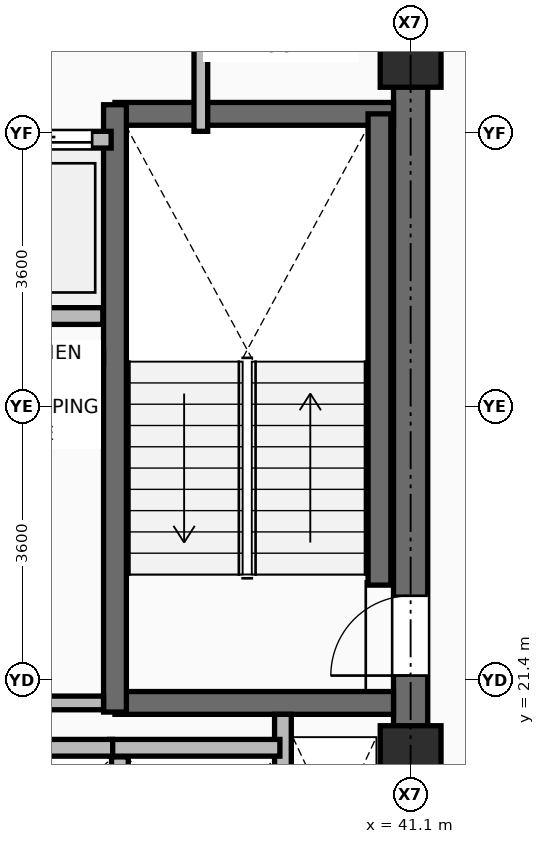
"""IFC4 building model, lengths in metres.
Left out: names, types, materials, properties, quantities, classifications, styles, units other than length and angle.
Written with IfcOpenShell. Run it as: python <this file> out.ifc"""

import sys

from ifc_helpers import new_model, si_unit, direction, frame, frame_2d, origin, origin_2d, place, context, subcontext, project, spatial, rectangle, extrude, element, fill, save


model = new_model("IFC4")
c1 = context("Model", 3, precision=1e-05, world=origin(), true_north=direction((0.0, 1.0)))
c2 = subcontext(c1, "Body", "Model", "MODEL_VIEW")
j1 = project(units=[si_unit("LENGTHUNIT", "METRE"), si_unit("PLANEANGLEUNIT", "RADIAN")], contexts=[c1])
p1 = place(None, origin())
s1 = spatial("IfcSite", under=j1, at=p1, CompositionType="ELEMENT")
p2 = place(p1, origin())
s2 = spatial("IfcBuilding", under=s1, at=p2, CompositionType="ELEMENT")
p3 = place(p2, frame((0.0, 0.0, 249.9)))
s3 = spatial("IfcBuildingStorey", under=s2, at=p3, CompositionType="ELEMENT", Elevation=249.9)
for number, where, z_axis, x_axis in (
    (1, (41.1, 20.4, 0.0), (0.0, 0.0, 1.0), (1.0, 0.0, 0.0)),
    (2, (41.1, 29.6, 0.0), (0.0, 0.0, 1.0), (1.0, 0.0, 0.0)),
):
    element("IfcColumn", number, at=place(p3, frame(where, z_axis=z_axis, x_axis=x_axis)), inside=s3, PredefinedType="COLUMN", context=c2, shape_type="SweptSolid", body=[
        extrude(rectangle(XDim=0.8, YDim=0.8, at=origin_2d()), origin(), (0.0, 0.0, 1.0), 3.75),
    ])
p4 = place(p3, frame((37.275, 18.08, 0.0), z_axis=(0.0, 0.0, 1.0), x_axis=(0.0, 1.0, 0.0)))
e3 = element("IfcWall", 3, at=p4, inside=s3, PredefinedType="PARTITIONING", context=c2, shape_type="SweptSolid", body=[
    extrude(rectangle(XDim=2.31, YDim=0.22, at=frame_2d((1.155, 0.0))), origin(), (0.0, 0.0, 1.0), 3.475),
])
p5 = place(p3, frame((34.91, 26.19, 0.0), z_axis=(0.0, 0.0, 1.0), x_axis=(1.0, 0.0, 0.0)))
e4 = element("IfcWall", 4, at=p5, inside=s3, PredefinedType="PARTITIONING", context=c2, shape_type="SweptSolid", body=[
    extrude(rectangle(XDim=2.14, YDim=0.22, at=frame_2d((1.07, 0.0))), origin(), (0.0, 0.0, 1.0), 3.475),
])
p6 = place(p3, frame((41.1, 18.025, 0.0), z_axis=(0.0, 0.0, 1.0), x_axis=(0.0, 1.0, 0.0)))
e5 = element("IfcWall", 5, at=p6, inside=s3, PredefinedType="SHEAR", context=c2, shape_type="SweptSolid", body=[
    extrude(rectangle(XDim=14.2, YDim=0.45, at=frame_2d((7.1, 0.0))), origin(), (0.0, 0.0, 1.0), 3.5),
])
p7 = place(p6, frame((3.435, 0.0, 0.0)))
e6 = element("IfcOpeningElement", 6, at=p7, cuts=e5, PredefinedType="OPENING", context=c2, shape_type="SweptSolid", body=[
    extrude(rectangle(XDim=1.05, YDim=2.1, at=frame_2d((0.525, 1.05))), frame((0.0, 0.235, 0.0), z_axis=(0.0, -1.0, 0.0), x_axis=(1.0, 0.0, 0.0)), (0.0, 0.0, 1.0), 0.47),
])
for number, where, z_axis, x_axis in (
    (7, (37.21, 21.1, 0.0), (0.0, 0.0, 1.0), (1.0, 0.0, 0.0)),
    (8, (37.21, 28.85, 0.0), (0.0, 0.0, 1.0), (1.0, 0.0, 0.0)),
):
    element("IfcWall", number, at=place(p3, frame(where, z_axis=z_axis, x_axis=x_axis)), inside=s3, PredefinedType="SHEAR", context=c2, shape_type="SweptSolid", body=[
        extrude(rectangle(XDim=3.665, YDim=0.3, at=frame_2d((1.833, 0.0))), origin(), (0.0, 0.0, 1.0), 3.5),
    ])
p8 = place(p3, frame((37.21, 20.98, 0.0), z_axis=(0.0, 0.0, 1.0), x_axis=(0.0, 1.0, 0.0)))
e9 = element("IfcWall", 9, at=p8, inside=s3, PredefinedType="SHEAR", context=c2, shape_type="SweptSolid", body=[
    extrude(rectangle(XDim=7.99, YDim=0.3, at=frame_2d((3.995, 0.0))), origin(), (0.0, 0.0, 1.0), 3.5),
])
p9 = place(p3, frame((40.69, 22.65, 0.0), z_axis=(0.0, 0.0, 1.0), x_axis=(0.0, 1.0, 0.0)))
e10 = element("IfcWall", 10, at=p9, inside=s3, PredefinedType="SHEAR", context=c2, shape_type="SweptSolid", body=[
    extrude(rectangle(XDim=6.2, YDim=0.3, at=frame_2d((3.1, 0.0))), origin(), (0.0, 0.0, 1.0), 3.5),
])
p10 = place(p3, frame((39.42, 18.025, 0.0), z_axis=(0.0, 0.0, 1.0), x_axis=(0.0, 1.0, 0.0)))
e11 = element("IfcWall", 11, at=p10, inside=s3, PredefinedType="PARTITIONING", context=c2, shape_type="SweptSolid", body=[
    extrude(rectangle(XDim=2.925, YDim=0.22, at=frame_2d((1.462, 0.0))), origin(), (0.0, 0.0, 1.0), 3.48),
])
for number, where, z_axis, x_axis in (
    (12, (37.14, 20.51, 0.0), (0.0, 0.0, 1.0), (1.0, 0.0, 0.0)),
    (13, (34.94, 20.51, 0.0), (0.0, 0.0, 1.0), (1.0, 0.0, 0.0)),
):
    element("IfcWall", number, at=place(p3, frame(where, z_axis=z_axis, x_axis=x_axis)), inside=s3, PredefinedType="PARTITIONING", context=c2, shape_type="SweptSolid", body=[
        extrude(rectangle(XDim=2.24, YDim=0.22, at=frame_2d((1.12, 0.0))), origin(), (0.0, 0.0, 1.0), 3.48),
    ])
p11 = place(p3, frame((35.56, 28.51, 0.0), z_axis=(0.0, 0.0, 1.0), x_axis=(1.0, 0.0, 0.0)))
e14 = element("IfcWall", 14, at=p11, inside=s3, PredefinedType="PARTITIONING", context=c2, shape_type="SweptSolid", body=[
    extrude(rectangle(XDim=1.6, YDim=0.22, at=frame_2d((0.8, 0.0))), origin(), (0.0, 0.0, 1.0), 3.48),
])
p12 = place(p11, frame((0.25, 0.0, 0.0)))
e15 = element("IfcOpeningElement", 15, at=p12, cuts=e14, PredefinedType="OPENING", context=c2, shape_type="SweptSolid", body=[
    extrude(rectangle(XDim=1.1, YDim=2.2, at=frame_2d((0.55, 1.1))), frame((0.0, 0.12, 0.0), z_axis=(0.0, -1.0, 0.0), x_axis=(1.0, 0.0, 0.0)), (0.0, 0.0, 1.0), 0.24),
])
p13 = place(p3, frame((34.98, 21.1, 0.0), z_axis=(0.0, 0.0, 1.0), x_axis=(1.0, 0.0, 0.0)))
e16 = element("IfcWall", 16, at=p13, inside=s3, PredefinedType="PARTITIONING", context=c2, shape_type="SweptSolid", body=[
    extrude(rectangle(XDim=2.08, YDim=0.18, at=frame_2d((1.04, 0.0))), origin(), (0.0, 0.0, 1.0), 3.48),
])
p14 = place(p3, frame((34.72, 25.65, 0.0), z_axis=(0.0, 0.0, 1.0), x_axis=(1.0, 0.0, 0.0)))
e17 = element("IfcWall", 17, at=p14, inside=s3, PredefinedType="PARTITIONING", context=c2, shape_type="SweptSolid", body=[
    extrude(rectangle(XDim=2.34, YDim=0.18, at=frame_2d((1.17, 0.0))), origin(), (0.0, 0.0, 1.0), 3.48),
])
p15 = place(p3, frame((38.34, 28.62, 0.0), z_axis=(0.0, 0.0, 1.0), x_axis=(0.0, 1.0, 0.0)))
e18 = element("IfcWall", 18, at=p15, inside=s3, PredefinedType="PARTITIONING", context=c2, shape_type="SweptSolid", body=[
    extrude(rectangle(XDim=3.605, YDim=0.18, at=frame_2d((1.802, 0.0))), origin(), (0.0, 0.0, 1.0), 3.48),
])
p16 = place(p7, origin())
e19 = element("IfcDoor", 19, at=p16, inside=s3, OperationType="SINGLE_SWING_LEFT", PredefinedType="DOOR", context=c2, shape_type="SweptSolid", body=[
    extrude(rectangle(XDim=1.05, YDim=2.1, at=frame_2d((0.525, 1.05))), frame((0.0, 0.025, 0.0), z_axis=(0.0, -1.0, 0.0), x_axis=(1.0, 0.0, 0.0)), (0.0, 0.0, 1.0), 0.05),
])
fill(e6, e19)
p17 = place(p12, origin())
e20 = element("IfcDoor", 20, at=p17, inside=s3, OperationType="DOUBLE_DOOR_SLIDING", PredefinedType="DOOR", context=c2, shape_type="SweptSolid", body=[
    extrude(rectangle(XDim=1.1, YDim=2.2, at=frame_2d((0.55, 1.1))), frame((0.0, 0.025, 0.0), z_axis=(0.0, -1.0, 0.0), x_axis=(1.0, 0.0, 0.0)), (0.0, 0.0, 1.0), 0.05),
])
fill(e15, e20)
save(model, sys.argv[1])
